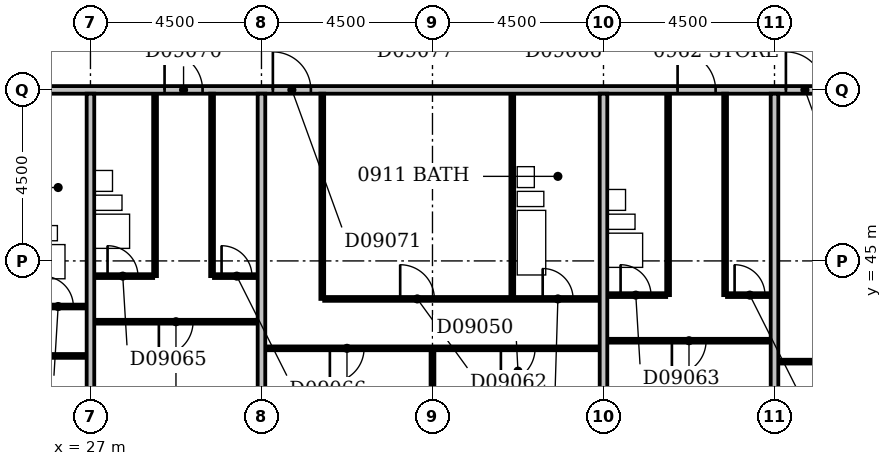
"""IFC4 building model, lengths in metres.
Left out: names, types, materials, properties, quantities, classifications, styles, units other than length and angle.
Written with IfcOpenShell. Run it as: python <this file> out.ifc"""

import sys

from ifc_helpers import new_model, si_unit, direction, frame, frame_2d, origin, place, context, subcontext, project, spatial, rectangle, extrude, element, fill, save


model = new_model("IFC4")
c1 = context("Model", 3, precision=1e-05, world=origin(), true_north=direction((0.0, 1.0)))
c2 = subcontext(c1, "Body", "Model", "MODEL_VIEW")
j1 = project(units=[si_unit("LENGTHUNIT", "METRE"), si_unit("PLANEANGLEUNIT", "RADIAN")], contexts=[c1])
p1 = place(None, origin())
s1 = spatial("IfcSite", under=j1, at=p1, CompositionType="ELEMENT")
p2 = place(p1, origin())
s2 = spatial("IfcBuilding", under=s1, at=p2, CompositionType="ELEMENT")
p3 = place(p2, frame((0.0, 0.0, 43.4)))
s3 = spatial("IfcBuildingStorey", under=s2, at=p3, CompositionType="ELEMENT", Elevation=43.4)
p4 = place(p3, frame((27.0, 36.6, 0.0), z_axis=(0.0, 0.0, 1.0), x_axis=(0.0, 1.0, 0.0)))
e1 = element("IfcWall", 1, at=p4, inside=s3, PredefinedType="PARTITIONING", context=c2, shape_type="SweptSolid", body=[
    extrude(rectangle(XDim=12.8, YDim=0.2, at=frame_2d((6.4, 0.0))), origin(), (0.0, 0.0, 1.0), 2.6),
])
p5 = place(p3, frame((31.5, 36.6, 0.0), z_axis=(0.0, 0.0, 1.0), x_axis=(0.0, 1.0, 0.0)))
e2 = element("IfcWall", 2, at=p5, inside=s3, PredefinedType="PARTITIONING", context=c2, shape_type="SweptSolid", body=[
    extrude(rectangle(XDim=12.8, YDim=0.2, at=frame_2d((6.4, 0.0))), origin(), (0.0, 0.0, 1.0), 3.3),
])
p6 = place(p3, frame((36.0, 36.6, 0.0), z_axis=(0.0, 0.0, 1.0), x_axis=(0.0, 1.0, 0.0)))
e3 = element("IfcWall", 3, at=p6, inside=s3, PredefinedType="PARTITIONING", context=c2, shape_type="SweptSolid", body=[
    extrude(rectangle(XDim=6.05, YDim=0.1, at=frame_2d((3.025, 0.0))), origin(), (0.0, 0.0, 1.0), 2.4),
])
p7 = place(p3, frame((40.5, 36.6, 0.0), z_axis=(0.0, 0.0, 1.0), x_axis=(0.0, 1.0, 0.0)))
e4 = element("IfcWall", 4, at=p7, inside=s3, PredefinedType="PARTITIONING", context=c2, shape_type="SweptSolid", body=[
    extrude(rectangle(XDim=12.8, YDim=0.2, at=frame_2d((6.4, 0.0))), origin(), (0.0, 0.0, 1.0), 3.3),
])
p8 = place(p3, frame((45.0, 36.6, 0.0), z_axis=(0.0, 0.0, 1.0), x_axis=(0.0, 1.0, 0.0)))
e5 = element("IfcWall", 5, at=p8, inside=s3, PredefinedType="PARTITIONING", context=c2, shape_type="SweptSolid", body=[
    extrude(rectangle(XDim=12.8, YDim=0.2, at=frame_2d((6.4, 0.0))), origin(), (0.0, 0.0, 1.0), 2.6),
])
p9 = place(p3, frame((45.1, 42.35, 0.0), z_axis=(0.0, 0.0, 1.0), x_axis=(1.0, 0.0, 0.0)))
e6 = element("IfcWall", 6, at=p9, inside=s3, PredefinedType="PARTITIONING", context=c2, shape_type="SweptSolid", body=[
    extrude(rectangle(XDim=17.8, YDim=0.1, at=frame_2d((8.9, 0.0))), origin(), (0.0, 0.0, 1.0), 3.3),
])
p10 = place(p9, frame((1.7, 0.0, 0.0)))
e7 = element("IfcOpeningElement", 7, at=p10, cuts=e6, PredefinedType="OPENING", context=c2, shape_type="SweptSolid", body=[
    extrude(rectangle(XDim=0.9, YDim=2.1, at=frame_2d((0.45, 1.05))), frame((0.0, 0.062, 0.0), z_axis=(0.0, -1.0, 0.0), x_axis=(1.0, 0.0, 0.0)), (0.0, 0.0, 1.0), 0.124),
])
p11 = place(p9, frame((6.2, 0.0, 0.0)))
e8 = element("IfcOpeningElement", 8, at=p11, cuts=e6, PredefinedType="OPENING", context=c2, shape_type="SweptSolid", body=[
    extrude(rectangle(XDim=0.9, YDim=2.1, at=frame_2d((0.45, 1.05))), frame((0.0, 0.062, 0.0), z_axis=(0.0, -1.0, 0.0), x_axis=(1.0, 0.0, 0.0)), (0.0, 0.0, 1.0), 0.124),
])
p12 = place(p9, frame((10.7, 0.0, 0.0)))
e9 = element("IfcOpeningElement", 9, at=p12, cuts=e6, PredefinedType="OPENING", context=c2, shape_type="SweptSolid", body=[
    extrude(rectangle(XDim=0.9, YDim=2.1, at=frame_2d((0.45, 1.05))), frame((0.0, 0.062, 0.0), z_axis=(0.0, -1.0, 0.0), x_axis=(1.0, 0.0, 0.0)), (0.0, 0.0, 1.0), 0.124),
])
p13 = place(p9, frame((15.2, 0.0, 0.0)))
e10 = element("IfcOpeningElement", 10, at=p13, cuts=e6, PredefinedType="OPENING", context=c2, shape_type="SweptSolid", body=[
    extrude(rectangle(XDim=0.9, YDim=2.1, at=frame_2d((0.45, 1.05))), frame((0.0, 0.062, 0.0), z_axis=(0.0, -1.0, 0.0), x_axis=(1.0, 0.0, 0.0)), (0.0, 0.0, 1.0), 0.124),
])
p14 = place(p3, frame((22.6, 42.5, 0.0), z_axis=(0.0, 0.0, 1.0), x_axis=(1.0, 0.0, 0.0)))
e11 = element("IfcWall", 11, at=p14, inside=s3, PredefinedType="PARTITIONING", context=c2, shape_type="SweptSolid", body=[
    extrude(rectangle(XDim=4.3, YDim=0.1, at=frame_2d((2.15, 0.0))), origin(), (0.0, 0.0, 1.0), 3.3),
])
p15 = place(p14, frame((1.7, 0.0, 0.0)))
e12 = element("IfcOpeningElement", 12, at=p15, cuts=e11, PredefinedType="OPENING", context=c2, shape_type="SweptSolid", body=[
    extrude(rectangle(XDim=0.9, YDim=2.1, at=frame_2d((0.45, 1.05))), frame((0.0, 0.062, 0.0), z_axis=(0.0, -1.0, 0.0), x_axis=(1.0, 0.0, 0.0)), (0.0, 0.0, 1.0), 0.124),
])
p16 = place(p3, frame((31.6, 42.7, 0.0), z_axis=(0.0, 0.0, 1.0), x_axis=(1.0, 0.0, 0.0)))
e13 = element("IfcWall", 13, at=p16, inside=s3, PredefinedType="PARTITIONING", context=c2, shape_type="SweptSolid", body=[
    extrude(rectangle(XDim=8.8, YDim=0.1, at=frame_2d((4.4, 0.0))), origin(), (0.0, 0.0, 1.0), 3.3),
])
p17 = place(p16, frame((1.7, 0.0, 0.0)))
e14 = element("IfcOpeningElement", 14, at=p17, cuts=e13, PredefinedType="OPENING", context=c2, shape_type="SweptSolid", body=[
    extrude(rectangle(XDim=0.9, YDim=2.1, at=frame_2d((0.45, 1.05))), frame((0.0, 0.062, 0.0), z_axis=(0.0, -1.0, 0.0), x_axis=(1.0, 0.0, 0.0)), (0.0, 0.0, 1.0), 0.124),
])
p18 = place(p16, frame((6.2, 0.0, 0.0)))
e15 = element("IfcOpeningElement", 15, at=p18, cuts=e13, PredefinedType="OPENING", context=c2, shape_type="SweptSolid", body=[
    extrude(rectangle(XDim=0.9, YDim=2.1, at=frame_2d((0.45, 1.05))), frame((0.0, 0.062, 0.0), z_axis=(0.0, -1.0, 0.0), x_axis=(1.0, 0.0, 0.0)), (0.0, 0.0, 1.0), 0.124),
])
p19 = place(p3, frame((40.6, 42.9, 0.0), z_axis=(0.0, 0.0, 1.0), x_axis=(1.0, 0.0, 0.0)))
e16 = element("IfcWall", 16, at=p19, inside=s3, PredefinedType="PARTITIONING", context=c2, shape_type="SweptSolid", body=[
    extrude(rectangle(XDim=4.3, YDim=0.1, at=frame_2d((2.15, 0.0))), origin(), (0.0, 0.0, 1.0), 3.3),
])
p20 = place(p19, frame((1.7, 0.0, 0.0)))
e17 = element("IfcOpeningElement", 17, at=p20, cuts=e16, PredefinedType="OPENING", context=c2, shape_type="SweptSolid", body=[
    extrude(rectangle(XDim=0.9, YDim=2.1, at=frame_2d((0.45, 1.05))), frame((0.0, 0.062, 0.0), z_axis=(0.0, -1.0, 0.0), x_axis=(1.0, 0.0, 0.0)), (0.0, 0.0, 1.0), 0.124),
])
p21 = place(p3, frame((27.1, 43.4, 0.0), z_axis=(0.0, 0.0, 1.0), x_axis=(1.0, 0.0, 0.0)))
e18 = element("IfcWall", 18, at=p21, inside=s3, PredefinedType="PARTITIONING", context=c2, shape_type="SweptSolid", body=[
    extrude(rectangle(XDim=4.3, YDim=0.1, at=frame_2d((2.15, 0.0))), origin(), (0.0, 0.0, 1.0), 3.3),
])
p22 = place(p21, frame((1.7, 0.0, 0.0)))
e19 = element("IfcOpeningElement", 19, at=p22, cuts=e18, PredefinedType="OPENING", context=c2, shape_type="SweptSolid", body=[
    extrude(rectangle(XDim=0.9, YDim=2.1, at=frame_2d((0.45, 1.05))), frame((0.0, 0.062, 0.0), z_axis=(0.0, -1.0, 0.0), x_axis=(1.0, 0.0, 0.0)), (0.0, 0.0, 1.0), 0.124),
])
p23 = place(p3, frame((25.35, 43.8, 0.0), z_axis=(0.0, 0.0, 1.0), x_axis=(1.0, 0.0, 0.0)))
e20 = element("IfcWall", 20, at=p23, inside=s3, PredefinedType="PARTITIONING", context=c2, shape_type="SweptSolid", body=[
    extrude(rectangle(XDim=1.55, YDim=0.1, at=frame_2d((0.775, 0.0))), origin(), (0.0, 0.0, 1.0), 3.3),
])
p24 = place(p23, frame((0.4, 0.0, 0.0)))
e21 = element("IfcOpeningElement", 21, at=p24, cuts=e20, PredefinedType="OPENING", context=c2, shape_type="SweptSolid", body=[
    extrude(rectangle(XDim=0.8, YDim=2.1, at=frame_2d((0.4, 1.05))), frame((0.0, 0.062, 0.0), z_axis=(0.0, -1.0, 0.0), x_axis=(1.0, 0.0, 0.0)), (0.0, 0.0, 1.0), 0.124),
])
p25 = place(p3, frame((33.1, 44.0, 0.0), z_axis=(0.0, 0.0, 1.0), x_axis=(0.0, 1.0, 0.0)))
e22 = element("IfcWall", 22, at=p25, inside=s3, PredefinedType="PARTITIONING", context=c2, shape_type="SweptSolid", body=[
    extrude(rectangle(XDim=5.4, YDim=0.1, at=frame_2d((2.7, 0.0))), origin(), (0.0, 0.0, 1.0), 3.3),
])
p26 = place(p3, frame((33.15, 44.0, 0.0), z_axis=(0.0, 0.0, 1.0), x_axis=(1.0, 0.0, 0.0)))
e23 = element("IfcWall", 23, at=p26, inside=s3, PredefinedType="PARTITIONING", context=c2, shape_type="SweptSolid", body=[
    extrude(rectangle(XDim=7.25, YDim=0.1, at=frame_2d((3.625, 0.0))), origin(), (0.0, 0.0, 1.0), 3.3),
])
p27 = place(p26, frame((5.75, 0.0, 0.0)))
e24 = element("IfcOpeningElement", 24, at=p27, cuts=e23, PredefinedType="OPENING", context=c2, shape_type="SweptSolid", body=[
    extrude(rectangle(XDim=0.8, YDim=2.1, at=frame_2d((0.4, 1.05))), frame((0.0, 0.062, 0.0), z_axis=(0.0, -1.0, 0.0), x_axis=(1.0, 0.0, 0.0)), (0.0, 0.0, 1.0), 0.124),
])
p28 = place(p26, frame((2.0, 0.0, 0.0)))
e25 = element("IfcOpeningElement", 25, at=p28, cuts=e23, PredefinedType="OPENING", context=c2, shape_type="SweptSolid", body=[
    extrude(rectangle(XDim=0.9, YDim=2.1, at=frame_2d((0.45, 1.05))), frame((0.0, 0.062, 0.0), z_axis=(0.0, -1.0, 0.0), x_axis=(1.0, 0.0, 0.0)), (0.0, 0.0, 1.0), 0.124),
])
p29 = place(p3, frame((38.1, 44.05, 0.0), z_axis=(0.0, 0.0, 1.0), x_axis=(0.0, 1.0, 0.0)))
e26 = element("IfcWall", 26, at=p29, inside=s3, PredefinedType="PLUMBINGWALL", context=c2, shape_type="SweptSolid", body=[
    extrude(rectangle(XDim=5.35, YDim=0.1, at=frame_2d((2.675, 0.0))), origin(), (0.0, 0.0, 1.0), 3.3),
])
p30 = place(p3, frame((40.6, 44.1, 0.0), z_axis=(0.0, 0.0, 1.0), x_axis=(1.0, 0.0, 0.0)))
e27 = element("IfcWall", 27, at=p30, inside=s3, PredefinedType="PARTITIONING", context=c2, shape_type="SweptSolid", body=[
    extrude(rectangle(XDim=1.55, YDim=0.1, at=frame_2d((0.775, 0.0))), origin(), (0.0, 0.0, 1.0), 3.3),
])
p31 = place(p30, frame((0.35, 0.0, 0.0)))
e28 = element("IfcOpeningElement", 28, at=p31, cuts=e27, PredefinedType="OPENING", context=c2, shape_type="SweptSolid", body=[
    extrude(rectangle(XDim=0.8, YDim=2.1, at=frame_2d((0.4, 1.05))), frame((0.0, 0.062, 0.0), z_axis=(0.0, -1.0, 0.0), x_axis=(1.0, 0.0, 0.0)), (0.0, 0.0, 1.0), 0.124),
])
p32 = place(p3, frame((42.2, 44.1, 0.0), z_axis=(0.0, 0.0, 1.0), x_axis=(0.0, 1.0, 0.0)))
e29 = element("IfcWall", 29, at=p32, inside=s3, PredefinedType="PLUMBINGWALL", context=c2, shape_type="SweptSolid", body=[
    extrude(rectangle(XDim=5.3, YDim=0.1, at=frame_2d((2.65, 0.0))), origin(), (0.0, 0.0, 1.0), 3.3),
])
p33 = place(p3, frame((43.7, 44.1, 0.0), z_axis=(0.0, 0.0, 1.0), x_axis=(0.0, 1.0, 0.0)))
e30 = element("IfcWall", 30, at=p33, inside=s3, PredefinedType="PARTITIONING", context=c2, shape_type="SweptSolid", body=[
    extrude(rectangle(XDim=5.3, YDim=0.1, at=frame_2d((2.65, 0.0))), origin(), (0.0, 0.0, 1.0), 3.3),
])
p34 = place(p3, frame((43.75, 44.1, 0.0), z_axis=(0.0, 0.0, 1.0), x_axis=(1.0, 0.0, 0.0)))
e31 = element("IfcWall", 31, at=p34, inside=s3, PredefinedType="PARTITIONING", context=c2, shape_type="SweptSolid", body=[
    extrude(rectangle(XDim=1.15, YDim=0.1, at=frame_2d((0.575, 0.0))), origin(), (0.0, 0.0, 1.0), 3.3),
])
p35 = place(p34, frame((0.2, 0.0, 0.0)))
e32 = element("IfcOpeningElement", 32, at=p35, cuts=e31, PredefinedType="OPENING", context=c2, shape_type="SweptSolid", body=[
    extrude(rectangle(XDim=0.8, YDim=2.1, at=frame_2d((0.4, 1.05))), frame((0.0, 0.062, 0.0), z_axis=(0.0, -1.0, 0.0), x_axis=(1.0, 0.0, 0.0)), (0.0, 0.0, 1.0), 0.124),
])
p36 = place(p3, frame((27.1, 44.6, 0.0), z_axis=(0.0, 0.0, 1.0), x_axis=(1.0, 0.0, 0.0)))
e33 = element("IfcWall", 33, at=p36, inside=s3, PredefinedType="PARTITIONING", context=c2, shape_type="SweptSolid", body=[
    extrude(rectangle(XDim=1.55, YDim=0.1, at=frame_2d((0.775, 0.0))), origin(), (0.0, 0.0, 1.0), 3.3),
])
p37 = place(p36, frame((0.35, 0.0, 0.0)))
e34 = element("IfcOpeningElement", 34, at=p37, cuts=e33, PredefinedType="OPENING", context=c2, shape_type="SweptSolid", body=[
    extrude(rectangle(XDim=0.8, YDim=2.1, at=frame_2d((0.4, 1.05))), frame((0.0, 0.062, 0.0), z_axis=(0.0, -1.0, 0.0), x_axis=(1.0, 0.0, 0.0)), (0.0, 0.0, 1.0), 0.124),
])
p38 = place(p3, frame((28.7, 44.6, 0.0), z_axis=(0.0, 0.0, 1.0), x_axis=(0.0, 1.0, 0.0)))
e35 = element("IfcWall", 35, at=p38, inside=s3, PredefinedType="PLUMBINGWALL", context=c2, shape_type="SweptSolid", body=[
    extrude(rectangle(XDim=4.8, YDim=0.1, at=frame_2d((2.4, 0.0))), origin(), (0.0, 0.0, 1.0), 3.3),
])
p39 = place(p3, frame((30.2, 44.6, 0.0), z_axis=(0.0, 0.0, 1.0), x_axis=(0.0, 1.0, 0.0)))
e36 = element("IfcWall", 36, at=p39, inside=s3, PredefinedType="PARTITIONING", context=c2, shape_type="SweptSolid", body=[
    extrude(rectangle(XDim=4.8, YDim=0.1, at=frame_2d((2.4, 0.0))), origin(), (0.0, 0.0, 1.0), 3.3),
])
p40 = place(p3, frame((30.25, 44.6, 0.0), z_axis=(0.0, 0.0, 1.0), x_axis=(1.0, 0.0, 0.0)))
e37 = element("IfcWall", 37, at=p40, inside=s3, PredefinedType="PARTITIONING", context=c2, shape_type="SweptSolid", body=[
    extrude(rectangle(XDim=1.15, YDim=0.1, at=frame_2d((0.575, 0.0))), origin(), (0.0, 0.0, 1.0), 3.3),
])
p41 = place(p40, frame((0.2, 0.0, 0.0)))
e38 = element("IfcOpeningElement", 38, at=p41, cuts=e37, PredefinedType="OPENING", context=c2, shape_type="SweptSolid", body=[
    extrude(rectangle(XDim=0.8, YDim=2.1, at=frame_2d((0.4, 1.05))), frame((0.0, 0.062, 0.0), z_axis=(0.0, -1.0, 0.0), x_axis=(1.0, 0.0, 0.0)), (0.0, 0.0, 1.0), 0.124),
])
p42 = place(p3, frame((9.1, 49.5, 0.0), z_axis=(0.0, 0.0, 1.0), x_axis=(1.0, 0.0, 0.0)))
e39 = element("IfcWall", 39, at=p42, inside=s3, PredefinedType="PARTITIONING", context=c2, shape_type="SweptSolid", body=[
    extrude(rectangle(XDim=57.8, YDim=0.2, at=frame_2d((28.9, 0.0))), origin(), (0.0, 0.0, 1.0), 3.3),
])
p43 = place(p42, frame((14.95, 0.0, 0.0)))
e40 = element("IfcOpeningElement", 40, at=p43, cuts=e39, PredefinedType="OPENING", context=c2, shape_type="SweptSolid", body=[
    extrude(rectangle(XDim=1.0, YDim=2.1, at=frame_2d((0.5, 1.05))), frame((0.0, 0.112, 0.0), z_axis=(0.0, -1.0, 0.0), x_axis=(1.0, 0.0, 0.0)), (0.0, 0.0, 1.0), 0.224),
])
p44 = place(p42, frame((19.85, 0.0, 0.0)))
e41 = element("IfcOpeningElement", 41, at=p44, cuts=e39, PredefinedType="OPENING", context=c2, shape_type="SweptSolid", body=[
    extrude(rectangle(XDim=1.0, YDim=2.1, at=frame_2d((0.5, 1.05))), frame((0.0, 0.112, 0.0), z_axis=(0.0, -1.0, 0.0), x_axis=(1.0, 0.0, 0.0)), (0.0, 0.0, 1.0), 0.224),
])
p45 = place(p42, frame((22.7, 0.0, 0.0)))
e42 = element("IfcOpeningElement", 42, at=p45, cuts=e39, PredefinedType="OPENING", context=c2, shape_type="SweptSolid", body=[
    extrude(rectangle(XDim=1.0, YDim=2.1, at=frame_2d((0.5, 1.05))), frame((0.0, 0.112, 0.0), z_axis=(0.0, -1.0, 0.0), x_axis=(1.0, 0.0, 0.0)), (0.0, 0.0, 1.0), 0.224),
])
p46 = place(p42, frame((33.35, 0.0, 0.0)))
e43 = element("IfcOpeningElement", 43, at=p46, cuts=e39, PredefinedType="OPENING", context=c2, shape_type="SweptSolid", body=[
    extrude(rectangle(XDim=1.0, YDim=2.1, at=frame_2d((0.5, 1.05))), frame((0.0, 0.112, 0.0), z_axis=(0.0, -1.0, 0.0), x_axis=(1.0, 0.0, 0.0)), (0.0, 0.0, 1.0), 0.224),
])
p47 = place(p42, frame((36.2, 0.0, 0.0)))
e44 = element("IfcOpeningElement", 44, at=p47, cuts=e39, PredefinedType="OPENING", context=c2, shape_type="SweptSolid", body=[
    extrude(rectangle(XDim=1.0, YDim=2.1, at=frame_2d((0.5, 1.05))), frame((0.0, 0.112, 0.0), z_axis=(0.0, -1.0, 0.0), x_axis=(1.0, 0.0, 0.0)), (0.0, 0.0, 1.0), 0.224),
])
p48 = place(p42, frame((54.15, 0.0, 0.0)))
e45 = element("IfcOpeningElement", 45, at=p48, cuts=e39, PredefinedType="OPENING", context=c2, shape_type="SweptSolid", body=[
    extrude(rectangle(XDim=1.0, YDim=2.1, at=frame_2d((0.5, 1.05))), frame((0.0, 0.112, 0.0), z_axis=(0.0, -1.0, 0.0), x_axis=(1.0, 0.0, 0.0)), (0.0, 0.0, 1.0), 0.224),
])
p49 = place(p42, frame((6.15, 0.0, 0.0)))
e46 = element("IfcOpeningElement", 46, at=p49, cuts=e39, PredefinedType="OPENING", context=c2, shape_type="SweptSolid", body=[
    extrude(rectangle(XDim=0.9, YDim=2.1, at=frame_2d((0.45, 1.05))), frame((0.0, 0.112, 0.0), z_axis=(0.0, -1.0, 0.0), x_axis=(1.0, 0.0, 0.0)), (0.0, 0.0, 1.0), 0.224),
])
p50 = place(p17, frame((0.9, 0.0, 0.0), z_axis=(0.0, 0.0, 1.0), x_axis=(-1.0, 0.0, 0.0)))
e47 = element("IfcDoor", 47, at=p50, inside=s3, OperationType="SINGLE_SWING_RIGHT", PredefinedType="DOOR", context=c2, shape_type="SweptSolid", body=[
    extrude(rectangle(XDim=0.9, YDim=2.1, at=frame_2d((0.45, 1.05))), frame((0.0, 0.025, 0.0), z_axis=(0.0, -1.0, 0.0), x_axis=(1.0, 0.0, 0.0)), (0.0, 0.0, 1.0), 0.05),
])
fill(e14, e47)
p51 = place(p18, frame((0.9, 0.0, 0.0), z_axis=(0.0, 0.0, 1.0), x_axis=(-1.0, 0.0, 0.0)))
e48 = element("IfcDoor", 48, at=p51, inside=s3, OperationType="SINGLE_SWING_RIGHT", PredefinedType="DOOR", context=c2, shape_type="SweptSolid", body=[
    extrude(rectangle(XDim=0.9, YDim=2.1, at=frame_2d((0.45, 1.05))), frame((0.0, 0.025, 0.0), z_axis=(0.0, -1.0, 0.0), x_axis=(1.0, 0.0, 0.0)), (0.0, 0.0, 1.0), 0.05),
])
fill(e15, e48)
p52 = place(p20, frame((0.9, 0.0, 0.0), z_axis=(0.0, 0.0, 1.0), x_axis=(-1.0, 0.0, 0.0)))
e49 = element("IfcDoor", 49, at=p52, inside=s3, OperationType="SINGLE_SWING_RIGHT", PredefinedType="DOOR", context=c2, shape_type="SweptSolid", body=[
    extrude(rectangle(XDim=0.9, YDim=2.1, at=frame_2d((0.45, 1.05))), frame((0.0, 0.025, 0.0), z_axis=(0.0, -1.0, 0.0), x_axis=(1.0, 0.0, 0.0)), (0.0, 0.0, 1.0), 0.05),
])
fill(e17, e49)
p53 = place(p22, frame((0.9, 0.0, 0.0), z_axis=(0.0, 0.0, 1.0), x_axis=(-1.0, 0.0, 0.0)))
e50 = element("IfcDoor", 50, at=p53, inside=s3, OperationType="SINGLE_SWING_RIGHT", PredefinedType="DOOR", context=c2, shape_type="SweptSolid", body=[
    extrude(rectangle(XDim=0.9, YDim=2.1, at=frame_2d((0.45, 1.05))), frame((0.0, 0.025, 0.0), z_axis=(0.0, -1.0, 0.0), x_axis=(1.0, 0.0, 0.0)), (0.0, 0.0, 1.0), 0.05),
])
fill(e19, e50)
p54 = place(p24, origin())
e51 = element("IfcDoor", 51, at=p54, inside=s3, OperationType="SINGLE_SWING_LEFT", PredefinedType="DOOR", context=c2, shape_type="SweptSolid", body=[
    extrude(rectangle(XDim=0.8, YDim=2.1, at=frame_2d((0.4, 1.05))), frame((0.0, 0.025, 0.0), z_axis=(0.0, -1.0, 0.0), x_axis=(1.0, 0.0, 0.0)), (0.0, 0.0, 1.0), 0.05),
])
fill(e21, e51)
p55 = place(p27, origin())
e52 = element("IfcDoor", 52, at=p55, inside=s3, OperationType="SINGLE_SWING_LEFT", PredefinedType="DOOR", context=c2, shape_type="SweptSolid", body=[
    extrude(rectangle(XDim=0.8, YDim=2.1, at=frame_2d((0.4, 1.05))), frame((0.0, 0.025, 0.0), z_axis=(0.0, -1.0, 0.0), x_axis=(1.0, 0.0, 0.0)), (0.0, 0.0, 1.0), 0.05),
])
fill(e24, e52)
p56 = place(p28, origin())
e53 = element("IfcDoor", 53, at=p56, inside=s3, OperationType="SINGLE_SWING_LEFT", PredefinedType="DOOR", context=c2, shape_type="SweptSolid", body=[
    extrude(rectangle(XDim=0.9, YDim=2.1, at=frame_2d((0.45, 1.05))), frame((0.0, 0.025, 0.0), z_axis=(0.0, -1.0, 0.0), x_axis=(1.0, 0.0, 0.0)), (0.0, 0.0, 1.0), 0.05),
])
fill(e25, e53)
p57 = place(p31, origin())
e54 = element("IfcDoor", 54, at=p57, inside=s3, OperationType="SINGLE_SWING_LEFT", PredefinedType="DOOR", context=c2, shape_type="SweptSolid", body=[
    extrude(rectangle(XDim=0.8, YDim=2.1, at=frame_2d((0.4, 1.05))), frame((0.0, 0.025, 0.0), z_axis=(0.0, -1.0, 0.0), x_axis=(1.0, 0.0, 0.0)), (0.0, 0.0, 1.0), 0.05),
])
fill(e28, e54)
p58 = place(p35, origin())
e55 = element("IfcDoor", 55, at=p58, inside=s3, OperationType="SINGLE_SWING_LEFT", PredefinedType="DOOR", context=c2, shape_type="SweptSolid", body=[
    extrude(rectangle(XDim=0.8, YDim=2.1, at=frame_2d((0.4, 1.05))), frame((0.0, 0.025, 0.0), z_axis=(0.0, -1.0, 0.0), x_axis=(1.0, 0.0, 0.0)), (0.0, 0.0, 1.0), 0.05),
])
fill(e32, e55)
p59 = place(p37, origin())
e56 = element("IfcDoor", 56, at=p59, inside=s3, OperationType="SINGLE_SWING_LEFT", PredefinedType="DOOR", context=c2, shape_type="SweptSolid", body=[
    extrude(rectangle(XDim=0.8, YDim=2.1, at=frame_2d((0.4, 1.05))), frame((0.0, 0.025, 0.0), z_axis=(0.0, -1.0, 0.0), x_axis=(1.0, 0.0, 0.0)), (0.0, 0.0, 1.0), 0.05),
])
fill(e34, e56)
p60 = place(p41, origin())
e57 = element("IfcDoor", 57, at=p60, inside=s3, OperationType="SINGLE_SWING_LEFT", PredefinedType="DOOR", context=c2, shape_type="SweptSolid", body=[
    extrude(rectangle(XDim=0.8, YDim=2.1, at=frame_2d((0.4, 1.05))), frame((0.0, 0.025, 0.0), z_axis=(0.0, -1.0, 0.0), x_axis=(1.0, 0.0, 0.0)), (0.0, 0.0, 1.0), 0.05),
])
fill(e38, e57)
p61 = place(p44, origin())
e58 = element("IfcDoor", 58, at=p61, inside=s3, OperationType="SINGLE_SWING_LEFT", PredefinedType="DOOR", context=c2, shape_type="SweptSolid", body=[
    extrude(rectangle(XDim=1.0, YDim=2.1, at=frame_2d((0.5, 1.05))), frame((0.0, 0.025, 0.0), z_axis=(0.0, -1.0, 0.0), x_axis=(1.0, 0.0, 0.0)), (0.0, 0.0, 1.0), 0.05),
])
fill(e41, e58)
p62 = place(p45, origin())
e59 = element("IfcDoor", 59, at=p62, inside=s3, OperationType="SINGLE_SWING_LEFT", PredefinedType="DOOR", context=c2, shape_type="SweptSolid", body=[
    extrude(rectangle(XDim=1.0, YDim=2.1, at=frame_2d((0.5, 1.05))), frame((0.0, 0.025, 0.0), z_axis=(0.0, -1.0, 0.0), x_axis=(1.0, 0.0, 0.0)), (0.0, 0.0, 1.0), 0.05),
])
fill(e42, e59)
p63 = place(p46, origin())
e60 = element("IfcDoor", 60, at=p63, inside=s3, OperationType="SINGLE_SWING_LEFT", PredefinedType="DOOR", context=c2, shape_type="SweptSolid", body=[
    extrude(rectangle(XDim=1.0, YDim=2.1, at=frame_2d((0.5, 1.05))), frame((0.0, 0.025, 0.0), z_axis=(0.0, -1.0, 0.0), x_axis=(1.0, 0.0, 0.0)), (0.0, 0.0, 1.0), 0.05),
])
fill(e43, e60)
p64 = place(p47, origin())
e61 = element("IfcDoor", 61, at=p64, inside=s3, OperationType="SINGLE_SWING_LEFT", PredefinedType="DOOR", context=c2, shape_type="SweptSolid", body=[
    extrude(rectangle(XDim=1.0, YDim=2.1, at=frame_2d((0.5, 1.05))), frame((0.0, 0.025, 0.0), z_axis=(0.0, -1.0, 0.0), x_axis=(1.0, 0.0, 0.0)), (0.0, 0.0, 1.0), 0.05),
])
fill(e44, e61)
save(model, sys.argv[1])
